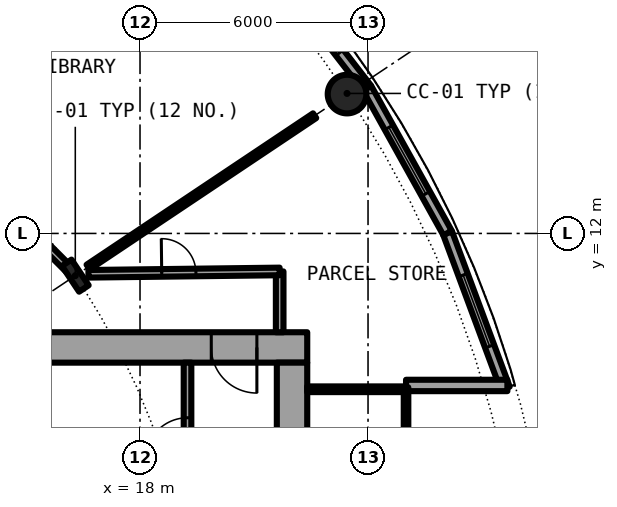
"""IFC4 building model, lengths in metres.
Left out: names, types, materials, properties, quantities, classifications, styles, units other than length and angle.
Written with IfcOpenShell. Run it as: python <this file> out.ifc"""

import sys

from ifc_helpers import new_model, si_unit, direction, frame, frame_2d, origin, origin_2d, place, context, subcontext, project, spatial, rectangle, hollow_circle, i_section, extrude, element, fill, save


model = new_model("IFC4")
c1 = context("Model", 3, precision=1e-05, world=origin(), true_north=direction((0.0, 1.0)))
c2 = subcontext(c1, "Body", "Model", "MODEL_VIEW")
j1 = project(units=[si_unit("LENGTHUNIT", "METRE"), si_unit("PLANEANGLEUNIT", "RADIAN")], contexts=[c1])
p1 = place(None, origin())
s1 = spatial("IfcSite", under=j1, at=p1, CompositionType="ELEMENT")
p2 = place(p1, origin())
s2 = spatial("IfcBuilding", under=s1, at=p2, CompositionType="ELEMENT")
p3 = place(p2, frame((0.0, 0.0, 14.1)))
s3 = spatial("IfcBuildingStorey", under=s2, at=p3, CompositionType="ELEMENT", Elevation=14.1)
p4 = place(p3, frame((23.448, 15.667, 0.0), z_axis=(0.0, 0.0, 1.0), x_axis=(1.0, 0.0, 0.0)))
e1 = element("IfcColumn", 1, at=p4, inside=s3, PredefinedType="COLUMN", context=c2, shape_type="SweptSolid", body=[
    extrude(hollow_circle(Radius=0.508, WallThickness=0.05, at=origin_2d()), origin(), (0.0, 0.0, 1.0), 4.2),
])
p5 = place(p3, frame((16.297, 10.889, 0.0), z_axis=(0.0, 0.0, 1.0), x_axis=(0.831469612303, 0.55557023302, 0.0)))
e2 = element("IfcColumn", 2, at=p5, inside=s3, PredefinedType="COLUMN", context=c2, shape_type="SweptSolid", body=[
    extrude(i_section(OverallWidth=0.303, OverallDepth=0.814, WebThickness=0.021, FlangeThickness=0.04, FilletRadius=0.03, at=origin_2d()), origin(), (0.0, 0.0, 1.0), 4.2),
])
p6 = place(p3, frame((27.61, 7.924, 0.0), z_axis=(0.0, 0.0, 1.0), x_axis=(-0.348003729264, 0.937493148998, 0.0)))
e3 = element("IfcWall", 3, at=p6, inside=s3, PredefinedType="SOLIDWALL", context=c2, shape_type="SweptSolid", body=[
    extrude(rectangle(XDim=4.359, YDim=0.25, at=frame_2d((2.18, 0.0))), origin(), (0.0, 0.0, 1.0), 3.8),
])
p7 = place(p6, frame((1.18, 0.0, 0.9)))
e4 = element("IfcOpeningElement", 4, at=p7, cuts=e3, PredefinedType="OPENING", context=c2, shape_type="SweptSolid", body=[
    extrude(rectangle(XDim=2.0, YDim=2.4, at=frame_2d((1.0, 1.2))), frame((0.0, 0.135, 0.0), z_axis=(0.0, -1.0, 0.0), x_axis=(1.0, 0.0, 0.0)), (0.0, 0.0, 1.0), 0.27),
])
p8 = place(p3, frame((26.093, 12.011, 0.0), z_axis=(0.0, 0.0, 1.0), x_axis=(-0.485761785263, 0.8740912355, 0.0)))
e5 = element("IfcWall", 5, at=p8, inside=s3, PredefinedType="SOLIDWALL", context=c2, shape_type="SweptSolid", body=[
    extrude(rectangle(XDim=4.36, YDim=0.25, at=frame_2d((2.18, 0.0))), origin(), (0.0, 0.0, 1.0), 3.8),
])
p9 = place(p8, frame((1.18, 0.0, 0.9)))
e6 = element("IfcOpeningElement", 6, at=p9, cuts=e5, PredefinedType="OPENING", context=c2, shape_type="SweptSolid", body=[
    extrude(rectangle(XDim=2.0, YDim=2.4, at=frame_2d((1.0, 1.2))), frame((0.0, 0.135, 0.0), z_axis=(0.0, -1.0, 0.0), x_axis=(1.0, 0.0, 0.0)), (0.0, 0.0, 1.0), 0.27),
])
p10 = place(p3, frame((23.975, 15.822, 0.0), z_axis=(0.0, 0.0, 1.0), x_axis=(-0.612637256412, 0.790364214812, 0.0)))
e7 = element("IfcWall", 7, at=p10, inside=s3, PredefinedType="SOLIDWALL", context=c2, shape_type="SweptSolid", body=[
    extrude(rectangle(XDim=4.36, YDim=0.25, at=frame_2d((2.18, 0.0))), origin(), (0.0, 0.0, 1.0), 3.8),
])
p11 = place(p10, frame((1.18, 0.0, 0.9)))
e8 = element("IfcOpeningElement", 8, at=p11, cuts=e7, PredefinedType="OPENING", context=c2, shape_type="SweptSolid", body=[
    extrude(rectangle(XDim=2.0, YDim=2.4, at=frame_2d((1.0, 1.2))), frame((0.0, 0.135, 0.0), z_axis=(0.0, -1.0, 0.0), x_axis=(1.0, 0.0, 0.0)), (0.0, 0.0, 1.0), 0.27),
])
p12 = place(p3, frame((25.0, 8.0, 0.0), z_axis=(0.0, 0.0, 1.0), x_axis=(1.0, 0.0, 0.0)))
e9 = element("IfcWall", 9, at=p12, inside=s3, PredefinedType="SOLIDWALL", context=c2, shape_type="SweptSolid", body=[
    extrude(rectangle(XDim=2.667, YDim=0.3, at=frame_2d((1.333, 0.0))), origin(), (0.0, 0.0, 1.0), 3.8),
])
p13 = place(p3, frame((22.4, 9.0, 0.0), z_axis=(0.0, 0.0, 1.0), x_axis=(-1.0, 0.0, 0.0)))
e10 = element("IfcWall", 10, at=p13, inside=s3, PredefinedType="SHEAR", context=c2, shape_type="SweptSolid", body=[
    extrude(rectangle(XDim=14.2, YDim=0.8, at=frame_2d((7.1, 0.0))), origin(), (0.0, 0.0, 1.0), 4.2),
])
p14 = place(p13, frame((1.325, 0.0, 0.0)))
e11 = element("IfcOpeningElement", 11, at=p14, cuts=e10, PredefinedType="OPENING", context=c2, shape_type="SweptSolid", body=[
    extrude(rectangle(XDim=1.2, YDim=2.3, at=frame_2d((0.6, 1.15))), frame((0.0, 0.41, 0.0), z_axis=(0.0, -1.0, 0.0), x_axis=(1.0, 0.0, 0.0)), (0.0, 0.0, 1.0), 0.82),
])
p15 = place(p3, frame((22.0, 8.6, 0.0), z_axis=(0.0, 0.0, 1.0), x_axis=(0.0, -1.0, 0.0)))
e12 = element("IfcWall", 12, at=p15, inside=s3, PredefinedType="SHEAR", context=c2, shape_type="SweptSolid", body=[
    extrude(rectangle(XDim=17.2, YDim=0.8, at=frame_2d((8.6, 0.0))), origin(), (0.0, 0.0, 1.0), 4.2),
])
p16 = place(p15, frame((7.7, 0.0, 0.0)))
e13 = element("IfcOpeningElement", 13, at=p16, cuts=e12, PredefinedType="OPENING", context=c2, shape_type="SweptSolid", body=[
    extrude(rectangle(XDim=1.8, YDim=2.3, at=frame_2d((0.9, 1.15))), frame((0.0, 0.41, 0.0), z_axis=(0.0, -1.0, 0.0), x_axis=(1.0, 0.0, 0.0)), (0.0, 0.0, 1.0), 0.82),
])
p17 = place(p3, frame((19.25, 1.575, 0.0), z_axis=(0.0, 0.0, 1.0), x_axis=(0.0, 1.0, 0.0)))
e14 = element("IfcWall", 14, at=p17, inside=s3, PredefinedType="SOLIDWALL", context=c2, shape_type="SweptSolid", body=[
    extrude(rectangle(XDim=7.025, YDim=0.2, at=frame_2d((3.513, 0.0))), origin(), (0.0, 0.0, 1.0), 3.8),
])
p18 = place(p17, frame((4.475, 0.0, 0.0)))
e15 = element("IfcOpeningElement", 15, at=p18, cuts=e14, PredefinedType="OPENING", context=c2, shape_type="SweptSolid", body=[
    extrude(rectangle(XDim=1.1, YDim=2.3, at=frame_2d((0.55, 1.15))), frame((0.0, 0.11, 0.0), z_axis=(0.0, -1.0, 0.0), x_axis=(1.0, 0.0, 0.0)), (0.0, 0.0, 1.0), 0.22),
])
p19 = place(p3, frame((22.4, 7.9, 0.0), z_axis=(0.0, 0.0, 1.0), x_axis=(1.0, 0.0, 0.0)))
e16 = element("IfcWall", 16, at=p19, inside=s3, PredefinedType="PARTITIONING", context=c2, shape_type="SweptSolid", body=[
    extrude(rectangle(XDim=2.54, YDim=0.15, at=frame_2d((1.27, 0.0))), origin(), (0.0, 0.0, 1.0), 3.8),
])
p20 = place(p3, frame((25.0, -7.95, 0.0), z_axis=(0.0, 0.0, 1.0), x_axis=(0.0, 1.0, 0.0)))
e17 = element("IfcWall", 17, at=p20, inside=s3, PredefinedType="PARTITIONING", context=c2, shape_type="SweptSolid", body=[
    extrude(rectangle(XDim=15.9, YDim=0.12, at=frame_2d((7.95, 0.0))), origin(), (0.0, 0.0, 1.0), 3.8),
])
p21 = place(p20, frame((0.95, 0.0, 0.1)))
e18 = element("IfcOpeningElement", 18, at=p21, cuts=e17, PredefinedType="OPENING", context=c2, shape_type="SweptSolid", body=[
    extrude(rectangle(XDim=14.0, YDim=3.45, at=frame_2d((7.0, 1.725))), frame((0.0, 0.07, 0.0), z_axis=(0.0, -1.0, 0.0), x_axis=(1.0, 0.0, 0.0)), (0.0, 0.0, 1.0), 0.14),
])
p22 = place(p3, frame((21.675, 9.4, 0.0), z_axis=(0.0, 0.0, 1.0), x_axis=(0.0, 1.0, 0.0)))
e19 = element("IfcWall", 19, at=p22, inside=s3, PredefinedType="PARTITIONING", context=c2, shape_type="SweptSolid", body=[
    extrude(rectangle(XDim=1.6, YDim=0.2, at=frame_2d((0.8, 0.0))), origin(), (0.0, 0.0, 1.0), 3.8),
])
p23 = place(p3, frame((16.635, 11.115, 0.0), z_axis=(0.0, 0.0, 1.0), x_axis=(0.831431488123, 0.555627285648, 0.0)))
e20 = element("IfcWall", 20, at=p23, inside=s3, PredefinedType="PARTITIONING", context=c2, shape_type="SweptSolid", body=[
    extrude(rectangle(XDim=7.168, YDim=0.15, at=frame_2d((3.584, 0.0))), origin(), (0.0, 0.0, 1.0), 3.8),
])
p24 = place(p3, frame((16.643, 10.938, 0.0), z_axis=(0.0, 0.0, 1.0), x_axis=(0.999924074118, 0.012322580895, 0.0)))
e21 = element("IfcWall", 21, at=p24, inside=s3, PredefinedType="PARTITIONING", context=c2, shape_type="SweptSolid", body=[
    extrude(rectangle(XDim=5.032, YDim=0.2, at=frame_2d((2.516, 0.0))), origin(), (0.0, 0.0, 1.0), 3.8),
])
p25 = place(p24, frame((1.928, 0.0, 0.0)))
e22 = element("IfcOpeningElement", 22, at=p25, cuts=e21, PredefinedType="OPENING", context=c2, shape_type="SweptSolid", body=[
    extrude(rectangle(XDim=0.9, YDim=2.3, at=frame_2d((0.45, 1.15))), frame((0.0, 0.11, 0.0), z_axis=(0.0, -1.0, 0.0), x_axis=(1.0, 0.0, 0.0)), (0.0, 0.0, 1.0), 0.22),
])
p26 = place(p3, frame((10.998, 16.188, 0.0), z_axis=(0.0, 0.0, 1.0), x_axis=(0.707106781187, -0.707106781187, 0.0)))
e23 = element("IfcWall", 23, at=p26, inside=s3, PredefinedType="PARTITIONING", context=c2, shape_type="SweptSolid", body=[
    extrude(rectangle(XDim=7.34, YDim=0.2, at=frame_2d((3.67, 0.0))), origin(), (0.0, 0.0, 1.0), 3.38),
])
p27 = place(p26, frame((3.17, 0.0, 0.0)))
e24 = element("IfcOpeningElement", 24, at=p27, cuts=e23, PredefinedType="OPENING", context=c2, shape_type="SweptSolid", body=[
    extrude(rectangle(XDim=1.0, YDim=2.3, at=frame_2d((0.5, 1.15))), frame((0.0, 0.11, 0.0), z_axis=(0.0, -1.0, 0.0), x_axis=(1.0, 0.0, 0.0)), (0.0, 0.0, 1.0), 0.22),
])
p28 = place(p7, origin())
e25 = element("IfcWindow", 25, at=p28, inside=s3, PartitioningType="SINGLE_PANEL", PredefinedType="WINDOW", context=c2, shape_type="SweptSolid", body=[
    extrude(rectangle(XDim=2.0, YDim=2.4, at=frame_2d((1.0, 1.2))), frame((0.0, 0.03, 0.0), z_axis=(0.0, -1.0, 0.0), x_axis=(1.0, 0.0, 0.0)), (0.0, 0.0, 1.0), 0.06),
])
fill(e4, e25)
p29 = place(p9, origin())
e26 = element("IfcWindow", 26, at=p29, inside=s3, PartitioningType="SINGLE_PANEL", PredefinedType="WINDOW", context=c2, shape_type="SweptSolid", body=[
    extrude(rectangle(XDim=2.0, YDim=2.4, at=frame_2d((1.0, 1.2))), frame((0.0, 0.03, 0.0), z_axis=(0.0, -1.0, 0.0), x_axis=(1.0, 0.0, 0.0)), (0.0, 0.0, 1.0), 0.06),
])
fill(e6, e26)
p30 = place(p11, origin())
e27 = element("IfcWindow", 27, at=p30, inside=s3, PartitioningType="SINGLE_PANEL", PredefinedType="WINDOW", context=c2, shape_type="SweptSolid", body=[
    extrude(rectangle(XDim=2.0, YDim=2.4, at=frame_2d((1.0, 1.2))), frame((0.0, 0.03, 0.0), z_axis=(0.0, -1.0, 0.0), x_axis=(1.0, 0.0, 0.0)), (0.0, 0.0, 1.0), 0.06),
])
fill(e8, e27)
p31 = place(p18, origin())
e28 = element("IfcDoor", 28, at=p31, inside=s3, OperationType="SINGLE_SWING_LEFT", PredefinedType="DOOR", context=c2, shape_type="SweptSolid", body=[
    extrude(rectangle(XDim=1.1, YDim=2.3, at=frame_2d((0.55, 1.15))), frame((0.0, 0.025, 0.0), z_axis=(0.0, -1.0, 0.0), x_axis=(1.0, 0.0, 0.0)), (0.0, 0.0, 1.0), 0.05),
])
fill(e15, e28)
p32 = place(p14, origin())
e29 = element("IfcDoor", 29, at=p32, inside=s3, OperationType="SINGLE_SWING_RIGHT", PredefinedType="DOOR", context=c2, shape_type="SweptSolid", body=[
    extrude(rectangle(XDim=1.2, YDim=2.3, at=frame_2d((0.6, 1.15))), frame((0.0, 0.025, 0.0), z_axis=(0.0, -1.0, 0.0), x_axis=(1.0, 0.0, 0.0)), (0.0, 0.0, 1.0), 0.05),
])
fill(e11, e29)
p33 = place(p21, origin())
e30 = element("IfcWindow", 30, at=p33, inside=s3, PartitioningType="SINGLE_PANEL", PredefinedType="WINDOW", context=c2, shape_type="SweptSolid", body=[
    extrude(rectangle(XDim=14.0, YDim=3.45, at=frame_2d((7.0, 1.725))), frame((0.0, 0.03, 0.0), z_axis=(0.0, -1.0, 0.0), x_axis=(1.0, 0.0, 0.0)), (0.0, 0.0, 1.0), 0.06),
])
fill(e18, e30)
p34 = place(p25, origin())
e31 = element("IfcDoor", 31, at=p34, inside=s3, OperationType="SINGLE_SWING_LEFT", PredefinedType="DOOR", context=c2, shape_type="SweptSolid", body=[
    extrude(rectangle(XDim=0.9, YDim=2.3, at=frame_2d((0.45, 1.15))), frame((0.0, 0.025, 0.0), z_axis=(0.0, -1.0, 0.0), x_axis=(1.0, 0.0, 0.0)), (0.0, 0.0, 1.0), 0.05),
])
fill(e22, e31)
save(model, sys.argv[1])
